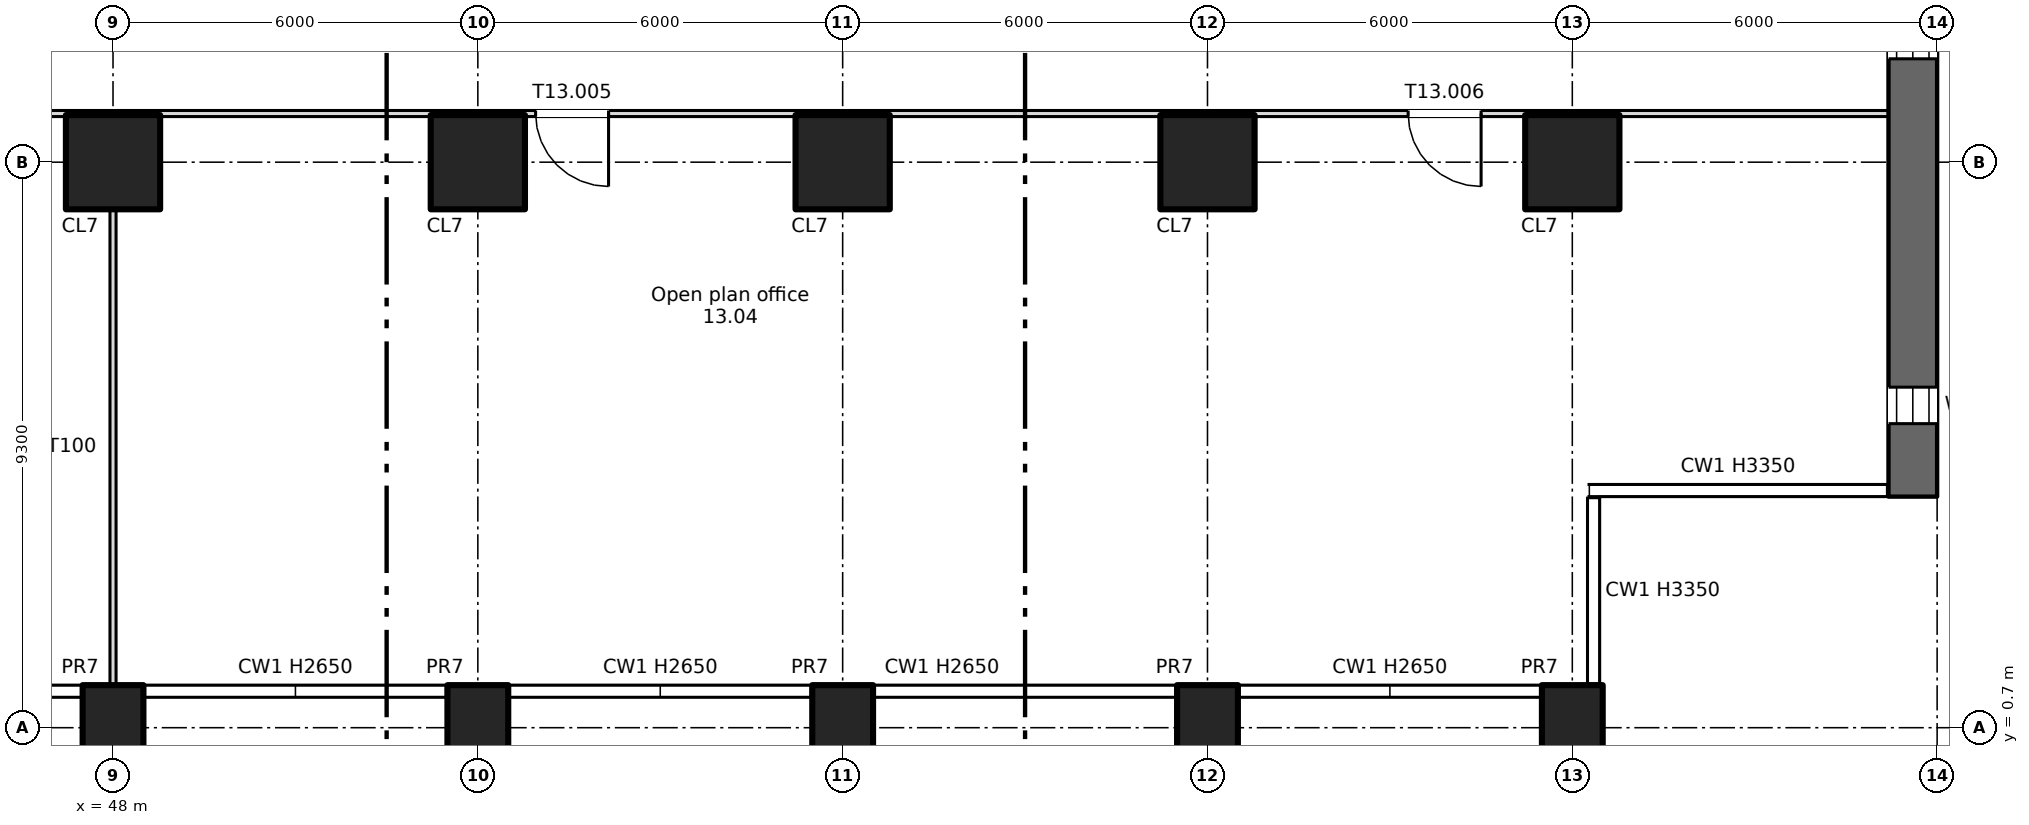
"""IFC4 building model, lengths in metres.
Left out: names, types, materials, properties, quantities, classifications, styles, units other than length and angle.
Written with IfcOpenShell. Run it as: python <this file> out.ifc"""

import sys

from ifc_helpers import new_model, si_unit, direction, frame, frame_2d, origin, origin_2d, place, context, subcontext, project, spatial, rectangle, extrude, element, fill, save


model = new_model("IFC4")
c1 = context("Model", 3, precision=1e-05, world=origin(), true_north=direction((0.0, 1.0)))
c2 = subcontext(c1, "Body", "Model", "MODEL_VIEW")
j1 = project(units=[si_unit("LENGTHUNIT", "METRE"), si_unit("PLANEANGLEUNIT", "RADIAN")], contexts=[c1])
p1 = place(None, origin())
s1 = spatial("IfcSite", under=j1, at=p1, CompositionType="ELEMENT")
p2 = place(p1, origin())
s2 = spatial("IfcBuilding", under=s1, at=p2, CompositionType="ELEMENT")
p3 = place(p2, frame((0.0, 0.0, 75.0)))
s3 = spatial("IfcBuildingStorey", under=s2, at=p3, CompositionType="ELEMENT", Elevation=75.0)
for number, where, z_axis, x_axis in (
    (1, (48.0, 0.7, -0.4), (0.0, 0.0, 1.0), (1.0, 0.0, 0.0)),
    (2, (54.0, 0.7, -0.4), (0.0, 0.0, 1.0), (1.0, 0.0, 0.0)),
    (3, (60.0, 0.7, -0.4), (0.0, 0.0, 1.0), (1.0, 0.0, 0.0)),
    (4, (66.0, 0.7, -0.4), (0.0, 0.0, 1.0), (1.0, 0.0, 0.0)),
    (5, (72.0, 0.7, -0.4), (0.0, 0.0, 1.0), (1.0, 0.0, 0.0)),
):
    element("IfcColumn", number, at=place(p3, frame(where, z_axis=z_axis, x_axis=x_axis)), inside=s3, PredefinedType="COLUMN", context=c2, shape_type="SweptSolid", body=[
        extrude(rectangle(XDim=1.0, YDim=1.4, at=origin_2d()), origin(), (0.0, 0.0, 1.0), 3.75),
    ])
for number, where, z_axis, x_axis in (
    (6, (48.0, 10.0, 0.0), (0.0, 0.0, 1.0), (1.0, 0.0, 0.0)),
    (7, (54.0, 10.0, 0.0), (0.0, 0.0, 1.0), (1.0, 0.0, 0.0)),
    (8, (60.0, 10.0, 0.0), (0.0, 0.0, 1.0), (1.0, 0.0, 0.0)),
    (9, (66.0, 10.0, 0.0), (0.0, 0.0, 1.0), (1.0, 0.0, 0.0)),
    (10, (72.0, 10.0, 0.0), (0.0, 0.0, 1.0), (1.0, 0.0, 0.0)),
):
    element("IfcColumn", number, at=place(p3, frame(where, z_axis=z_axis, x_axis=x_axis)), inside=s3, PredefinedType="COLUMN", context=c2, shape_type="SweptSolid", body=[
        extrude(rectangle(XDim=1.55, YDim=1.55, at=origin_2d()), origin(), (0.0, 0.0, 1.0), 3.35),
    ])
p4 = place(p3, frame((77.6, 4.5, 0.0), z_axis=(0.0, 0.0, 1.0), x_axis=(0.0, 1.0, 0.0)))
e11 = element("IfcWall", 11, at=p4, inside=s3, PredefinedType="SHEAR", context=c2, shape_type="SweptSolid", body=[
    extrude(rectangle(XDim=37.0, YDim=0.8, at=frame_2d((18.5, 0.0))), origin(), (0.0, 0.0, 1.0), 3.35),
])
p5 = place(p4, frame((1.2, 0.0, 0.6)))
e12 = element("IfcOpeningElement", 12, at=p5, cuts=e11, PredefinedType="OPENING", context=c2, shape_type="SweptSolid", body=[
    extrude(rectangle(XDim=0.6, YDim=2.4, at=frame_2d((0.3, 1.2))), frame((0.0, 0.41, 0.0), z_axis=(0.0, -1.0, 0.0), x_axis=(1.0, 0.0, 0.0)), (0.0, 0.0, 1.0), 0.82),
])
p6 = place(p4, frame((7.2, 0.0, 0.6)))
e13 = element("IfcOpeningElement", 13, at=p6, cuts=e11, PredefinedType="OPENING", context=c2, shape_type="SweptSolid", body=[
    extrude(rectangle(XDim=0.6, YDim=2.4, at=frame_2d((0.3, 1.2))), frame((0.0, 0.41, 0.0), z_axis=(0.0, -1.0, 0.0), x_axis=(1.0, 0.0, 0.0)), (0.0, 0.0, 1.0), 0.82),
])
p7 = place(p4, frame((13.2, 0.0, 0.6)))
e14 = element("IfcOpeningElement", 14, at=p7, cuts=e11, PredefinedType="OPENING", context=c2, shape_type="SweptSolid", body=[
    extrude(rectangle(XDim=0.6, YDim=2.4, at=frame_2d((0.3, 1.2))), frame((0.0, 0.41, 0.0), z_axis=(0.0, -1.0, 0.0), x_axis=(1.0, 0.0, 0.0)), (0.0, 0.0, 1.0), 0.82),
])
p8 = place(p4, frame((19.2, 0.0, 0.6)))
e15 = element("IfcOpeningElement", 15, at=p8, cuts=e11, PredefinedType="OPENING", context=c2, shape_type="SweptSolid", body=[
    extrude(rectangle(XDim=0.6, YDim=2.4, at=frame_2d((0.3, 1.2))), frame((0.0, 0.41, 0.0), z_axis=(0.0, -1.0, 0.0), x_axis=(1.0, 0.0, 0.0)), (0.0, 0.0, 1.0), 0.82),
])
p9 = place(p4, frame((25.2, 0.0, 0.6)))
e16 = element("IfcOpeningElement", 16, at=p9, cuts=e11, PredefinedType="OPENING", context=c2, shape_type="SweptSolid", body=[
    extrude(rectangle(XDim=0.6, YDim=2.4, at=frame_2d((0.3, 1.2))), frame((0.0, 0.41, 0.0), z_axis=(0.0, -1.0, 0.0), x_axis=(1.0, 0.0, 0.0)), (0.0, 0.0, 1.0), 0.82),
])
p10 = place(p4, frame((31.2, 0.0, 0.6)))
e17 = element("IfcOpeningElement", 17, at=p10, cuts=e11, PredefinedType="OPENING", context=c2, shape_type="SweptSolid", body=[
    extrude(rectangle(XDim=0.6, YDim=2.4, at=frame_2d((0.3, 1.2))), frame((0.0, 0.41, 0.0), z_axis=(0.0, -1.0, 0.0), x_axis=(1.0, 0.0, 0.0)), (0.0, 0.0, 1.0), 0.82),
])
p11 = place(p3, frame((0.8, 10.8, 0.0), z_axis=(0.0, 0.0, 1.0), x_axis=(1.0, 0.0, 0.0)))
e18 = element("IfcWall", 18, at=p11, inside=s3, PredefinedType="PARTITIONING", context=c2, shape_type="SweptSolid", body=[
    extrude(rectangle(XDim=76.4, YDim=0.1, at=frame_2d((38.2, 0.0))), origin(), (0.0, 0.0, 1.0), 3.35),
])
p12 = place(p11, frame((33.1, 0.0, 0.0)))
e19 = element("IfcOpeningElement", 19, at=p12, cuts=e18, PredefinedType="OPENING", context=c2, shape_type="SweptSolid", body=[
    extrude(rectangle(XDim=1.2, YDim=2.1, at=frame_2d((0.6, 1.05))), frame((0.0, 0.06, 0.0), z_axis=(0.0, -1.0, 0.0), x_axis=(1.0, 0.0, 0.0)), (0.0, 0.0, 1.0), 0.12),
])
p13 = place(p11, frame((42.1, 0.0, 0.0)))
e20 = element("IfcOpeningElement", 20, at=p13, cuts=e18, PredefinedType="OPENING", context=c2, shape_type="SweptSolid", body=[
    extrude(rectangle(XDim=1.2, YDim=2.1, at=frame_2d((0.6, 1.05))), frame((0.0, 0.06, 0.0), z_axis=(0.0, -1.0, 0.0), x_axis=(1.0, 0.0, 0.0)), (0.0, 0.0, 1.0), 0.12),
])
p14 = place(p11, frame((6.7, 0.0, 0.0)))
e21 = element("IfcOpeningElement", 21, at=p14, cuts=e18, PredefinedType="OPENING", context=c2, shape_type="SweptSolid", body=[
    extrude(rectangle(XDim=1.2, YDim=2.1, at=frame_2d((0.6, 1.05))), frame((0.0, 0.06, 0.0), z_axis=(0.0, -1.0, 0.0), x_axis=(1.0, 0.0, 0.0)), (0.0, 0.0, 1.0), 0.12),
])
p15 = place(p11, frame((21.05, 0.0, 0.0)))
e22 = element("IfcOpeningElement", 22, at=p15, cuts=e18, PredefinedType="OPENING", context=c2, shape_type="SweptSolid", body=[
    extrude(rectangle(XDim=1.2, YDim=2.1, at=frame_2d((0.6, 1.05))), frame((0.0, 0.06, 0.0), z_axis=(0.0, -1.0, 0.0), x_axis=(1.0, 0.0, 0.0)), (0.0, 0.0, 1.0), 0.12),
])
p16 = place(p11, frame((54.15, 0.0, 0.0)))
e23 = element("IfcOpeningElement", 23, at=p16, cuts=e18, PredefinedType="OPENING", context=c2, shape_type="SweptSolid", body=[
    extrude(rectangle(XDim=1.2, YDim=2.1, at=frame_2d((0.6, 1.05))), frame((0.0, 0.06, 0.0), z_axis=(0.0, -1.0, 0.0), x_axis=(1.0, 0.0, 0.0)), (0.0, 0.0, 1.0), 0.12),
])
p17 = place(p11, frame((68.5, 0.0, 0.0)))
e24 = element("IfcOpeningElement", 24, at=p17, cuts=e18, PredefinedType="OPENING", context=c2, shape_type="SweptSolid", body=[
    extrude(rectangle(XDim=1.2, YDim=2.1, at=frame_2d((0.6, 1.05))), frame((0.0, 0.06, 0.0), z_axis=(0.0, -1.0, 0.0), x_axis=(1.0, 0.0, 0.0)), (0.0, 0.0, 1.0), 0.12),
])
p18 = place(p3, frame((48.0, 1.4, 0.0), z_axis=(0.0, 0.0, 1.0), x_axis=(0.0, 1.0, 0.0)))
e25 = element("IfcWall", 25, at=p18, inside=s3, PredefinedType="PARTITIONING", context=c2, shape_type="SweptSolid", body=[
    extrude(rectangle(XDim=7.825, YDim=0.1, at=frame_2d((3.913, 0.0))), origin(), (0.0, 0.0, 1.0), 3.35),
])
p19 = place(p5, origin())
e26 = element("IfcWindow", 26, at=p19, inside=s3, PartitioningType="SINGLE_PANEL", PredefinedType="WINDOW", context=c2, shape_type="SweptSolid", body=[
    extrude(rectangle(XDim=0.6, YDim=2.4, at=frame_2d((0.3, 1.2))), frame((0.0, 0.03, 0.0), z_axis=(0.0, -1.0, 0.0), x_axis=(1.0, 0.0, 0.0)), (0.0, 0.0, 1.0), 0.06),
])
fill(e12, e26)
p20 = place(p6, origin())
e27 = element("IfcWindow", 27, at=p20, inside=s3, PartitioningType="SINGLE_PANEL", PredefinedType="WINDOW", context=c2, shape_type="SweptSolid", body=[
    extrude(rectangle(XDim=0.6, YDim=2.4, at=frame_2d((0.3, 1.2))), frame((0.0, 0.03, 0.0), z_axis=(0.0, -1.0, 0.0), x_axis=(1.0, 0.0, 0.0)), (0.0, 0.0, 1.0), 0.06),
])
fill(e13, e27)
p21 = place(p16, origin())
e28 = element("IfcDoor", 28, at=p21, inside=s3, OperationType="SINGLE_SWING_RIGHT", PredefinedType="DOOR", context=c2, shape_type="SweptSolid", body=[
    extrude(rectangle(XDim=1.2, YDim=2.1, at=frame_2d((0.6, 1.05))), frame((0.0, 0.025, 0.0), z_axis=(0.0, -1.0, 0.0), x_axis=(1.0, 0.0, 0.0)), (0.0, 0.0, 1.0), 0.05),
])
fill(e23, e28)
p22 = place(p17, origin())
e29 = element("IfcDoor", 29, at=p22, inside=s3, OperationType="SINGLE_SWING_RIGHT", PredefinedType="DOOR", context=c2, shape_type="SweptSolid", body=[
    extrude(rectangle(XDim=1.2, YDim=2.1, at=frame_2d((0.6, 1.05))), frame((0.0, 0.025, 0.0), z_axis=(0.0, -1.0, 0.0), x_axis=(1.0, 0.0, 0.0)), (0.0, 0.0, 1.0), 0.05),
])
fill(e24, e29)
save(model, sys.argv[1])
